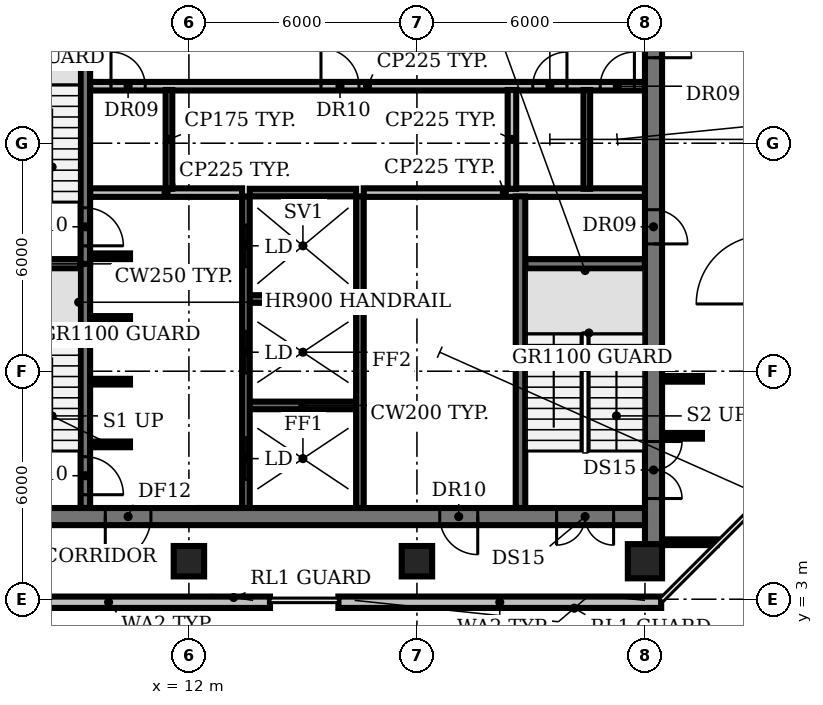
"""IFC4 building model, lengths in metres.
Left out: names, types, materials, properties, quantities, classifications, styles, units other than length and angle.
Written with IfcOpenShell. Run it as: python <this file> out.ifc"""

import sys

from ifc_helpers import new_model, si_unit, direction, frame, frame_2d, origin, origin_2d, place, context, subcontext, project, spatial, rectangle, circle, extrude, element, fill, save


model = new_model("IFC4")
c1 = context("Model", 3, precision=1e-05, world=origin(), true_north=direction((0.0, 1.0)))
c2 = subcontext(c1, "Body", "Model", "MODEL_VIEW")
j1 = project(units=[si_unit("LENGTHUNIT", "METRE"), si_unit("PLANEANGLEUNIT", "RADIAN")], contexts=[c1])
p1 = place(None, origin())
s1 = spatial("IfcSite", under=j1, at=p1, CompositionType="ELEMENT")
p2 = place(p1, origin())
s2 = spatial("IfcBuilding", under=s1, at=p2, CompositionType="ELEMENT")
p3 = place(p2, frame((0.0, 0.0, 247.4)))
s3 = spatial("IfcBuildingStorey", under=s2, at=p3, CompositionType="ELEMENT", Elevation=247.4)
for number, where, z_axis, x_axis in (
    (1, (12.0, 4.0, 0.0), (0.0, 0.0, 1.0), (1.0, 0.0, 0.0)),
    (2, (18.0, 4.0, 0.0), (0.0, 0.0, 1.0), (1.0, 0.0, 0.0)),
):
    element("IfcColumn", number, at=place(p3, frame(where, z_axis=z_axis, x_axis=x_axis)), inside=s3, PredefinedType="COLUMN", context=c2, shape_type="SweptSolid", body=[
        extrude(rectangle(XDim=0.8, YDim=0.8, at=origin_2d()), origin(), (0.0, 0.0, 1.0), 3.85),
    ])
p4 = place(p3, frame((24.0, 4.0, 0.0), z_axis=(0.0, 0.0, 1.0), x_axis=(1.0, 0.0, 0.0)))
e3 = element("IfcColumn", 3, at=p4, inside=s3, PredefinedType="COLUMN", context=c2, shape_type="SweptSolid", body=[
    extrude(circle(Radius=0.45, at=origin_2d()), origin(), (0.0, 0.0, 1.0), 3.85),
])
p5 = place(p3, frame((5.64, 2.92, 0.0), z_axis=(0.0, 0.0, 1.0), x_axis=(1.0, 0.0, 0.0)))
e4 = element("IfcWall", 4, at=p5, inside=s3, PredefinedType="SOLIDWALL", context=c2, shape_type="SweptSolid", body=[
    extrude(rectangle(XDim=8.493, YDim=0.3, at=frame_2d((4.247, 0.0))), origin(), (0.0, 0.0, 1.0), 3.85),
])
p6 = place(p3, frame((15.933, 2.92, 0.0), z_axis=(0.0, 0.0, 1.0), x_axis=(1.0, 0.0, 0.0)))
e5 = element("IfcWall", 5, at=p6, inside=s3, PredefinedType="SOLIDWALL", context=c2, shape_type="SweptSolid", body=[
    extrude(rectangle(XDim=8.493, YDim=0.3, at=frame_2d((4.247, 0.0))), origin(), (0.0, 0.0, 1.0), 3.85),
])
p7 = place(p3, frame((9.4, 7.075, 0.0), z_axis=(0.0, 0.0, 1.0), x_axis=(1.0, 0.0, 0.0)))
e6 = element("IfcWall", 6, at=p7, inside=s3, PredefinedType="SHEAR", context=c2, shape_type="SweptSolid", body=[
    extrude(rectangle(XDim=1.05, YDim=0.15, at=frame_2d((0.525, 0.0))), origin(), (0.0, 0.0, 1.0), 3.85),
])
p8 = place(p3, frame((13.6, 8.1, 0.0), z_axis=(0.0, 0.0, 1.0), x_axis=(1.0, 0.0, 0.0)))
e7 = element("IfcWall", 7, at=p8, inside=s3, PredefinedType="SHEAR", context=c2, shape_type="SweptSolid", body=[
    extrude(rectangle(XDim=2.8, YDim=0.2, at=frame_2d((1.4, 0.0))), origin(), (0.0, 0.0, 1.0), 3.85),
])
for number, where, z_axis, x_axis in (
    (8, (9.4, 8.725, 0.0), (0.0, 0.0, 1.0), (1.0, 0.0, 0.0)),
    (9, (9.4, 10.375, 0.0), (0.0, 0.0, 1.0), (1.0, 0.0, 0.0)),
):
    element("IfcWall", number, at=place(p3, frame(where, z_axis=z_axis, x_axis=x_axis)), inside=s3, PredefinedType="SHEAR", context=c2, shape_type="SweptSolid", body=[
        extrude(rectangle(XDim=1.05, YDim=0.15, at=frame_2d((0.525, 0.0))), origin(), (0.0, 0.0, 1.0), 3.85),
    ])
p9 = place(p3, frame((13.6, 10.9, 0.0), z_axis=(0.0, 0.0, 1.0), x_axis=(1.0, 0.0, 0.0)))
e10 = element("IfcWall", 10, at=p9, inside=s3, PredefinedType="SHEAR", context=c2, shape_type="SweptSolid", body=[
    extrude(rectangle(XDim=2.8, YDim=0.2, at=frame_2d((1.4, 0.0))), origin(), (0.0, 0.0, 1.0), 3.85),
])
for number, where, z_axis, x_axis in (
    (11, (6.0, 11.825, 0.0), (0.0, 0.0, 1.0), (1.0, 0.0, 0.0)),
    (12, (20.85, 11.825, 0.0), (0.0, 0.0, 1.0), (1.0, 0.0, 0.0)),
):
    element("IfcWall", number, at=place(p3, frame(where, z_axis=z_axis, x_axis=x_axis)), inside=s3, PredefinedType="SHEAR", context=c2, shape_type="SweptSolid", body=[
        extrude(rectangle(XDim=3.15, YDim=0.25, at=frame_2d((1.575, 0.0))), origin(), (0.0, 0.0, 1.0), 3.85),
    ])
p10 = place(p3, frame((9.4, 12.025, 0.0), z_axis=(0.0, 0.0, 1.0), x_axis=(1.0, 0.0, 0.0)))
e13 = element("IfcWall", 13, at=p10, inside=s3, PredefinedType="SHEAR", context=c2, shape_type="SweptSolid", body=[
    extrude(rectangle(XDim=1.05, YDim=0.15, at=frame_2d((0.525, 0.0))), origin(), (0.0, 0.0, 1.0), 3.85),
])
p11 = place(p3, frame((9.4, 13.7, 0.0), z_axis=(0.0, 0.0, 1.0), x_axis=(1.0, 0.0, 0.0)))
e14 = element("IfcWall", 14, at=p11, inside=s3, PredefinedType="PARTITIONING", context=c2, shape_type="SweptSolid", body=[
    extrude(rectangle(XDim=4.0, YDim=0.225, at=frame_2d((2.0, 0.0))), origin(), (0.0, 0.0, 1.0), 3.85),
])
p12 = place(p3, frame((13.6, 13.7, 0.0), z_axis=(0.0, 0.0, 1.0), x_axis=(1.0, 0.0, 0.0)))
e15 = element("IfcWall", 15, at=p12, inside=s3, PredefinedType="SHEAR", context=c2, shape_type="SweptSolid", body=[
    extrude(rectangle(XDim=2.8, YDim=0.2, at=frame_2d((1.4, 0.0))), origin(), (0.0, 0.0, 1.0), 3.85),
])
p13 = place(p3, frame((16.6, 13.7, 0.0), z_axis=(0.0, 0.0, 1.0), x_axis=(1.0, 0.0, 0.0)))
e16 = element("IfcWall", 16, at=p13, inside=s3, PredefinedType="PARTITIONING", context=c2, shape_type="SweptSolid", body=[
    extrude(rectangle(XDim=7.4, YDim=0.225, at=frame_2d((3.7, 0.0))), origin(), (0.0, 0.0, 1.0), 3.85),
])
p14 = place(p3, frame((9.4, 16.5, 0.0), z_axis=(0.0, 0.0, 1.0), x_axis=(1.0, 0.0, 0.0)))
e17 = element("IfcWall", 17, at=p14, inside=s3, PredefinedType="PARTITIONING", context=c2, shape_type="SweptSolid", body=[
    extrude(rectangle(XDim=14.6, YDim=0.225, at=frame_2d((7.3, 0.0))), origin(), (0.0, 0.0, 1.0), 3.85),
])
p15 = place(p14, frame((0.55, 0.0, 0.0)))
e18 = element("IfcOpeningElement", 18, at=p15, cuts=e17, PredefinedType="OPENING", context=c2, shape_type="SweptSolid", body=[
    extrude(rectangle(XDim=0.9, YDim=2.1, at=frame_2d((0.45, 1.05))), frame((0.0, 0.123, 0.0), z_axis=(0.0, -1.0, 0.0), x_axis=(1.0, 0.0, 0.0)), (0.0, 0.0, 1.0), 0.245),
])
p16 = place(p14, frame((6.075, 0.0, 0.0)))
e19 = element("IfcOpeningElement", 19, at=p16, cuts=e17, PredefinedType="OPENING", context=c2, shape_type="SweptSolid", body=[
    extrude(rectangle(XDim=1.0, YDim=2.1, at=frame_2d((0.5, 1.05))), frame((0.0, 0.123, 0.0), z_axis=(0.0, -1.0, 0.0), x_axis=(1.0, 0.0, 0.0)), (0.0, 0.0, 1.0), 0.245),
])
p17 = place(p14, frame((11.647, 0.0, 0.0)))
e20 = element("IfcOpeningElement", 20, at=p17, cuts=e17, PredefinedType="OPENING", context=c2, shape_type="SweptSolid", body=[
    extrude(rectangle(XDim=0.9, YDim=2.1, at=frame_2d((0.45, 1.05))), frame((0.0, 0.123, 0.0), z_axis=(0.0, -1.0, 0.0), x_axis=(1.0, 0.0, 0.0)), (0.0, 0.0, 1.0), 0.245),
])
p18 = place(p14, frame((13.423, 0.0, 0.0)))
e21 = element("IfcOpeningElement", 21, at=p18, cuts=e17, PredefinedType="OPENING", context=c2, shape_type="SweptSolid", body=[
    extrude(rectangle(XDim=0.9, YDim=2.1, at=frame_2d((0.45, 1.05))), frame((0.0, 0.123, 0.0), z_axis=(0.0, -1.0, 0.0), x_axis=(1.0, 0.0, 0.0)), (0.0, 0.0, 1.0), 0.245),
])
p19 = place(p3, frame((9.275, 11.825, 0.0), z_axis=(0.0, 0.0, 1.0), x_axis=(0.0, -1.0, 0.0)))
e22 = element("IfcWall", 22, at=p19, inside=s3, PredefinedType="SHEAR", context=c2, shape_type="SweptSolid", body=[
    extrude(rectangle(XDim=6.425, YDim=0.25, at=frame_2d((3.212, 0.0))), origin(), (0.0, 0.0, 1.0), 3.85),
])
p20 = place(p19, frame((5.075, 0.0, 0.0)))
e23 = element("IfcOpeningElement", 23, at=p20, cuts=e22, PredefinedType="OPENING", context=c2, shape_type="SweptSolid", body=[
    extrude(rectangle(XDim=1.0, YDim=2.1, at=frame_2d((0.5, 1.05))), frame((0.0, 0.135, 0.0), z_axis=(0.0, -1.0, 0.0), x_axis=(1.0, 0.0, 0.0)), (0.0, 0.0, 1.0), 0.27),
])
p21 = place(p3, frame((9.275, 18.375, 0.0), z_axis=(0.0, 0.0, 1.0), x_axis=(0.0, -1.0, 0.0)))
e24 = element("IfcWall", 24, at=p21, inside=s3, PredefinedType="SHEAR", context=c2, shape_type="SweptSolid", body=[
    extrude(rectangle(XDim=6.55, YDim=0.25, at=frame_2d((3.275, 0.0))), origin(), (0.0, 0.0, 1.0), 3.85),
])
p22 = place(p21, frame((5.075, 0.0, 0.0)))
e25 = element("IfcOpeningElement", 25, at=p22, cuts=e24, PredefinedType="OPENING", context=c2, shape_type="SweptSolid", body=[
    extrude(rectangle(XDim=1.0, YDim=2.1, at=frame_2d((0.5, 1.05))), frame((0.0, 0.135, 0.0), z_axis=(0.0, -1.0, 0.0), x_axis=(1.0, 0.0, 0.0)), (0.0, 0.0, 1.0), 0.27),
])
p23 = place(p3, frame((11.475, 13.8, 0.0), z_axis=(0.0, 0.0, 1.0), x_axis=(0.0, 1.0, 0.0)))
e26 = element("IfcWall", 26, at=p23, inside=s3, PredefinedType="PARTITIONING", context=c2, shape_type="SweptSolid", body=[
    extrude(rectangle(XDim=2.6, YDim=0.175, at=frame_2d((1.3, 0.0))), origin(), (0.0, 0.0, 1.0), 3.85),
])
p24 = place(p3, frame((13.5, 5.4, 0.0), z_axis=(0.0, 0.0, 1.0), x_axis=(0.0, 1.0, 0.0)))
e27 = element("IfcWall", 27, at=p24, inside=s3, PredefinedType="SHEAR", context=c2, shape_type="SweptSolid", body=[
    extrude(rectangle(XDim=8.2, YDim=0.2, at=frame_2d((4.1, 0.0))), origin(), (0.0, 0.0, 1.0), 3.85),
])
p25 = place(p24, frame((0.75, 0.0, 0.0)))
e28 = element("IfcOpeningElement", 28, at=p25, cuts=e27, PredefinedType="OPENING", context=c2, shape_type="SweptSolid", body=[
    extrude(rectangle(XDim=1.1, YDim=2.1, at=frame_2d((0.55, 1.05))), frame((0.0, 0.11, 0.0), z_axis=(0.0, -1.0, 0.0), x_axis=(1.0, 0.0, 0.0)), (0.0, 0.0, 1.0), 0.22),
])
p26 = place(p24, frame((3.55, 0.0, 0.0)))
e29 = element("IfcOpeningElement", 29, at=p26, cuts=e27, PredefinedType="OPENING", context=c2, shape_type="SweptSolid", body=[
    extrude(rectangle(XDim=1.1, YDim=2.1, at=frame_2d((0.55, 1.05))), frame((0.0, 0.11, 0.0), z_axis=(0.0, -1.0, 0.0), x_axis=(1.0, 0.0, 0.0)), (0.0, 0.0, 1.0), 0.22),
])
p27 = place(p24, frame((6.35, 0.0, 0.0)))
e30 = element("IfcOpeningElement", 30, at=p27, cuts=e27, PredefinedType="OPENING", context=c2, shape_type="SweptSolid", body=[
    extrude(rectangle(XDim=1.1, YDim=2.1, at=frame_2d((0.55, 1.05))), frame((0.0, 0.11, 0.0), z_axis=(0.0, -1.0, 0.0), x_axis=(1.0, 0.0, 0.0)), (0.0, 0.0, 1.0), 0.22),
])
p28 = place(p3, frame((16.5, 5.4, 0.0), z_axis=(0.0, 0.0, 1.0), x_axis=(0.0, 1.0, 0.0)))
e31 = element("IfcWall", 31, at=p28, inside=s3, PredefinedType="SHEAR", context=c2, shape_type="SweptSolid", body=[
    extrude(rectangle(XDim=8.2, YDim=0.2, at=frame_2d((4.1, 0.0))), origin(), (0.0, 0.0, 1.0), 3.85),
])
p29 = place(p3, frame((20.5, 13.8, 0.0), z_axis=(0.0, 0.0, 1.0), x_axis=(0.0, 1.0, 0.0)))
e32 = element("IfcWall", 32, at=p29, inside=s3, PredefinedType="PARTITIONING", context=c2, shape_type="SweptSolid", body=[
    extrude(rectangle(XDim=2.6, YDim=0.225, at=frame_2d((1.3, 0.0))), origin(), (0.0, 0.0, 1.0), 3.85),
])
p30 = place(p3, frame((20.725, 5.4, 0.0), z_axis=(0.0, 0.0, 1.0), x_axis=(0.0, 1.0, 0.0)))
e33 = element("IfcWall", 33, at=p30, inside=s3, PredefinedType="SHEAR", context=c2, shape_type="SweptSolid", body=[
    extrude(rectangle(XDim=8.2, YDim=0.25, at=frame_2d((4.1, 0.0))), origin(), (0.0, 0.0, 1.0), 3.85),
])
p31 = place(p3, frame((22.47, 13.8, 0.0), z_axis=(0.0, 0.0, 1.0), x_axis=(0.0, 1.0, 0.0)))
e34 = element("IfcWall", 34, at=p31, inside=s3, PredefinedType="PARTITIONING", context=c2, shape_type="SweptSolid", body=[
    extrude(rectangle(XDim=2.6, YDim=0.175, at=frame_2d((1.3, 0.0))), origin(), (0.0, 0.0, 1.0), 3.85),
])
p32 = place(p3, frame((24.225, 25.25, 0.0), z_axis=(0.0, 0.0, 1.0), x_axis=(0.0, -1.0, 0.0)))
e35 = element("IfcWall", 35, at=p32, inside=s3, PredefinedType="SHEAR", context=c2, shape_type="SweptSolid", body=[
    extrude(rectangle(XDim=20.83, YDim=0.45, at=frame_2d((10.415, 0.0))), origin(), (0.0, 0.0, 1.0), 3.85),
])
p33 = place(p32, frame((18.1, 0.0, 0.0)))
e36 = element("IfcOpeningElement", 36, at=p33, cuts=e35, PredefinedType="OPENING", context=c2, shape_type="SweptSolid", body=[
    extrude(rectangle(XDim=1.5, YDim=2.1, at=frame_2d((0.75, 1.05))), frame((0.0, 0.235, 0.0), z_axis=(0.0, -1.0, 0.0), x_axis=(1.0, 0.0, 0.0)), (0.0, 0.0, 1.0), 0.47),
])
p34 = place(p32, frame((12.0, 0.0, 0.0)))
e37 = element("IfcOpeningElement", 37, at=p34, cuts=e35, PredefinedType="OPENING", context=c2, shape_type="SweptSolid", body=[
    extrude(rectangle(XDim=0.9, YDim=2.1, at=frame_2d((0.45, 1.05))), frame((0.0, 0.235, 0.0), z_axis=(0.0, -1.0, 0.0), x_axis=(1.0, 0.0, 0.0)), (0.0, 0.0, 1.0), 0.47),
])
p35 = place(p32, frame((6.0, 0.0, 0.0)))
e38 = element("IfcOpeningElement", 38, at=p35, cuts=e35, PredefinedType="OPENING", context=c2, shape_type="SweptSolid", body=[
    extrude(rectangle(XDim=2.0, YDim=2.1, at=frame_2d((1.0, 1.05))), frame((0.0, 0.235, 0.0), z_axis=(0.0, -1.0, 0.0), x_axis=(1.0, 0.0, 0.0)), (0.0, 0.0, 1.0), 0.47),
])
p36 = place(p3, frame((24.0, 5.175, 0.0), z_axis=(0.0, 0.0, 1.0), x_axis=(-1.0, 0.0, 0.0)))
e39 = element("IfcWall", 39, at=p36, inside=s3, PredefinedType="SHEAR", context=c2, shape_type="SweptSolid", body=[
    extrude(rectangle(XDim=18.0, YDim=0.45, at=frame_2d((9.0, 0.0))), origin(), (0.0, 0.0, 1.0), 3.85),
])
p37 = place(p36, frame((0.825, 0.0, 0.0)))
e40 = element("IfcOpeningElement", 40, at=p37, cuts=e39, PredefinedType="OPENING", context=c2, shape_type="SweptSolid", body=[
    extrude(rectangle(XDim=1.5, YDim=2.1, at=frame_2d((0.75, 1.05))), frame((0.0, 0.235, 0.0), z_axis=(0.0, -1.0, 0.0), x_axis=(1.0, 0.0, 0.0)), (0.0, 0.0, 1.0), 0.47),
])
p38 = place(p36, frame((15.675, 0.0, 0.0)))
e41 = element("IfcOpeningElement", 41, at=p38, cuts=e39, PredefinedType="OPENING", context=c2, shape_type="SweptSolid", body=[
    extrude(rectangle(XDim=1.5, YDim=2.1, at=frame_2d((0.75, 1.05))), frame((0.0, 0.235, 0.0), z_axis=(0.0, -1.0, 0.0), x_axis=(1.0, 0.0, 0.0)), (0.0, 0.0, 1.0), 0.47),
])
p39 = place(p36, frame((13.0, 0.0, 0.0)))
e42 = element("IfcOpeningElement", 42, at=p39, cuts=e39, PredefinedType="OPENING", context=c2, shape_type="SweptSolid", body=[
    extrude(rectangle(XDim=1.2, YDim=2.1, at=frame_2d((0.6, 1.05))), frame((0.0, 0.235, 0.0), z_axis=(0.0, -1.0, 0.0), x_axis=(1.0, 0.0, 0.0)), (0.0, 0.0, 1.0), 0.47),
])
p40 = place(p36, frame((4.4, 0.0, 0.0)))
e43 = element("IfcOpeningElement", 43, at=p40, cuts=e39, PredefinedType="OPENING", context=c2, shape_type="SweptSolid", body=[
    extrude(rectangle(XDim=1.0, YDim=2.1, at=frame_2d((0.5, 1.05))), frame((0.0, 0.235, 0.0), z_axis=(0.0, -1.0, 0.0), x_axis=(1.0, 0.0, 0.0)), (0.0, 0.0, 1.0), 0.47),
])
for number, where, z_axis, x_axis in (
    (44, (24.45, 7.3, 0.0), (0.0, 0.0, 1.0), (1.0, 0.0, 0.0)),
    (45, (24.45, 8.8, 0.0), (0.0, 0.0, 1.0), (1.0, 0.0, 0.0)),
):
    element("IfcWall", number, at=place(p3, frame(where, z_axis=z_axis, x_axis=x_axis)), inside=s3, PredefinedType="PARTITIONING", context=c2, shape_type="SweptSolid", body=[
        extrude(rectangle(XDim=1.05, YDim=0.15, at=frame_2d((0.525, 0.0))), origin(), (0.0, 0.0, 1.0), 2.88),
    ])
p41 = place(p3, frame((24.55, 4.5, 0.0), z_axis=(0.0, 0.0, 1.0), x_axis=(1.0, 0.0, 0.0)))
e46 = element("IfcWall", 46, at=p41, inside=s3, PredefinedType="PARTITIONING", context=c2, shape_type="SweptSolid", body=[
    extrude(rectangle(XDim=1.34, YDim=0.15, at=frame_2d((0.67, 0.0))), origin(), (0.0, 0.0, 1.0), 2.88),
])
p42 = place(p15, origin())
e47 = element("IfcDoor", 47, at=p42, inside=s3, OperationType="SINGLE_SWING_LEFT", PredefinedType="DOOR", context=c2, shape_type="SweptSolid", body=[
    extrude(rectangle(XDim=0.9, YDim=2.1, at=frame_2d((0.45, 1.05))), frame((0.0, 0.025, 0.0), z_axis=(0.0, -1.0, 0.0), x_axis=(1.0, 0.0, 0.0)), (0.0, 0.0, 1.0), 0.05),
])
fill(e18, e47)
p43 = place(p16, origin())
e48 = element("IfcDoor", 48, at=p43, inside=s3, OperationType="SINGLE_SWING_LEFT", PredefinedType="DOOR", context=c2, shape_type="SweptSolid", body=[
    extrude(rectangle(XDim=1.0, YDim=2.1, at=frame_2d((0.5, 1.05))), frame((0.0, 0.025, 0.0), z_axis=(0.0, -1.0, 0.0), x_axis=(1.0, 0.0, 0.0)), (0.0, 0.0, 1.0), 0.05),
])
fill(e19, e48)
p44 = place(p17, origin())
e49 = element("IfcDoor", 49, at=p44, inside=s3, OperationType="SINGLE_SWING_RIGHT", PredefinedType="DOOR", context=c2, shape_type="SweptSolid", body=[
    extrude(rectangle(XDim=0.9, YDim=2.1, at=frame_2d((0.45, 1.05))), frame((0.0, 0.025, 0.0), z_axis=(0.0, -1.0, 0.0), x_axis=(1.0, 0.0, 0.0)), (0.0, 0.0, 1.0), 0.05),
])
fill(e20, e49)
p45 = place(p18, origin())
e50 = element("IfcDoor", 50, at=p45, inside=s3, OperationType="SINGLE_SWING_RIGHT", PredefinedType="DOOR", context=c2, shape_type="SweptSolid", body=[
    extrude(rectangle(XDim=0.9, YDim=2.1, at=frame_2d((0.45, 1.05))), frame((0.0, 0.025, 0.0), z_axis=(0.0, -1.0, 0.0), x_axis=(1.0, 0.0, 0.0)), (0.0, 0.0, 1.0), 0.05),
])
fill(e21, e50)
p46 = place(p20, origin())
e51 = element("IfcDoor", 51, at=p46, inside=s3, OperationType="SINGLE_SWING_RIGHT", PredefinedType="DOOR", context=c2, shape_type="SweptSolid", body=[
    extrude(rectangle(XDim=1.0, YDim=2.1, at=frame_2d((0.5, 1.05))), frame((0.0, 0.025, 0.0), z_axis=(0.0, -1.0, 0.0), x_axis=(1.0, 0.0, 0.0)), (0.0, 0.0, 1.0), 0.05),
])
fill(e23, e51)
p47 = place(p22, origin())
e52 = element("IfcDoor", 52, at=p47, inside=s3, OperationType="SINGLE_SWING_RIGHT", PredefinedType="DOOR", context=c2, shape_type="SweptSolid", body=[
    extrude(rectangle(XDim=1.0, YDim=2.1, at=frame_2d((0.5, 1.05))), frame((0.0, 0.025, 0.0), z_axis=(0.0, -1.0, 0.0), x_axis=(1.0, 0.0, 0.0)), (0.0, 0.0, 1.0), 0.05),
])
fill(e25, e52)
p48 = place(p25, origin())
e53 = element("IfcDoor", 53, at=p48, inside=s3, OperationType="DOUBLE_DOOR_SLIDING", PredefinedType="DOOR", context=c2, shape_type="SweptSolid", body=[
    extrude(rectangle(XDim=1.1, YDim=2.1, at=frame_2d((0.55, 1.05))), frame((0.0, 0.025, 0.0), z_axis=(0.0, -1.0, 0.0), x_axis=(1.0, 0.0, 0.0)), (0.0, 0.0, 1.0), 0.05),
])
fill(e28, e53)
p49 = place(p26, origin())
e54 = element("IfcDoor", 54, at=p49, inside=s3, OperationType="DOUBLE_DOOR_SLIDING", PredefinedType="DOOR", context=c2, shape_type="SweptSolid", body=[
    extrude(rectangle(XDim=1.1, YDim=2.1, at=frame_2d((0.55, 1.05))), frame((0.0, 0.025, 0.0), z_axis=(0.0, -1.0, 0.0), x_axis=(1.0, 0.0, 0.0)), (0.0, 0.0, 1.0), 0.05),
])
fill(e29, e54)
p50 = place(p27, origin())
e55 = element("IfcDoor", 55, at=p50, inside=s3, OperationType="DOUBLE_DOOR_SLIDING", PredefinedType="DOOR", context=c2, shape_type="SweptSolid", body=[
    extrude(rectangle(XDim=1.1, YDim=2.1, at=frame_2d((0.55, 1.05))), frame((0.0, 0.025, 0.0), z_axis=(0.0, -1.0, 0.0), x_axis=(1.0, 0.0, 0.0)), (0.0, 0.0, 1.0), 0.05),
])
fill(e30, e55)
p51 = place(p33, origin())
e56 = element("IfcDoor", 56, at=p51, inside=s3, OperationType="DOUBLE_DOOR_SINGLE_SWING", PredefinedType="DOOR", context=c2, shape_type="SweptSolid", body=[
    extrude(rectangle(XDim=1.5, YDim=2.1, at=frame_2d((0.75, 1.05))), frame((0.0, 0.025, 0.0), z_axis=(0.0, -1.0, 0.0), x_axis=(1.0, 0.0, 0.0)), (0.0, 0.0, 1.0), 0.05),
])
fill(e36, e56)
p52 = place(p34, origin())
e57 = element("IfcDoor", 57, at=p52, inside=s3, OperationType="SINGLE_SWING_RIGHT", PredefinedType="DOOR", context=c2, shape_type="SweptSolid", body=[
    extrude(rectangle(XDim=0.9, YDim=2.1, at=frame_2d((0.45, 1.05))), frame((0.0, 0.025, 0.0), z_axis=(0.0, -1.0, 0.0), x_axis=(1.0, 0.0, 0.0)), (0.0, 0.0, 1.0), 0.05),
])
fill(e37, e57)
p53 = place(p35, origin())
e58 = element("IfcDoor", 58, at=p53, inside=s3, OperationType="DOUBLE_DOOR_SINGLE_SWING", PredefinedType="DOOR", context=c2, shape_type="SweptSolid", body=[
    extrude(rectangle(XDim=2.0, YDim=2.1, at=frame_2d((1.0, 1.05))), frame((0.0, 0.025, 0.0), z_axis=(0.0, -1.0, 0.0), x_axis=(1.0, 0.0, 0.0)), (0.0, 0.0, 1.0), 0.05),
])
fill(e38, e58)
p54 = place(p37, origin())
e59 = element("IfcDoor", 59, at=p54, inside=s3, OperationType="DOUBLE_DOOR_SINGLE_SWING", PredefinedType="DOOR", context=c2, shape_type="SweptSolid", body=[
    extrude(rectangle(XDim=1.5, YDim=2.1, at=frame_2d((0.75, 1.05))), frame((0.0, 0.025, 0.0), z_axis=(0.0, -1.0, 0.0), x_axis=(1.0, 0.0, 0.0)), (0.0, 0.0, 1.0), 0.05),
])
fill(e40, e59)
p55 = place(p39, origin())
e60 = element("IfcDoor", 60, at=p55, inside=s3, OperationType="SINGLE_SWING_RIGHT", PredefinedType="DOOR", context=c2, shape_type="SweptSolid", body=[
    extrude(rectangle(XDim=1.2, YDim=2.1, at=frame_2d((0.6, 1.05))), frame((0.0, 0.025, 0.0), z_axis=(0.0, -1.0, 0.0), x_axis=(1.0, 0.0, 0.0)), (0.0, 0.0, 1.0), 0.05),
])
fill(e42, e60)
p56 = place(p40, origin())
e61 = element("IfcDoor", 61, at=p56, inside=s3, OperationType="SINGLE_SWING_LEFT", PredefinedType="DOOR", context=c2, shape_type="SweptSolid", body=[
    extrude(rectangle(XDim=1.0, YDim=2.1, at=frame_2d((0.5, 1.05))), frame((0.0, 0.025, 0.0), z_axis=(0.0, -1.0, 0.0), x_axis=(1.0, 0.0, 0.0)), (0.0, 0.0, 1.0), 0.05),
])
fill(e43, e61)
save(model, sys.argv[1])
